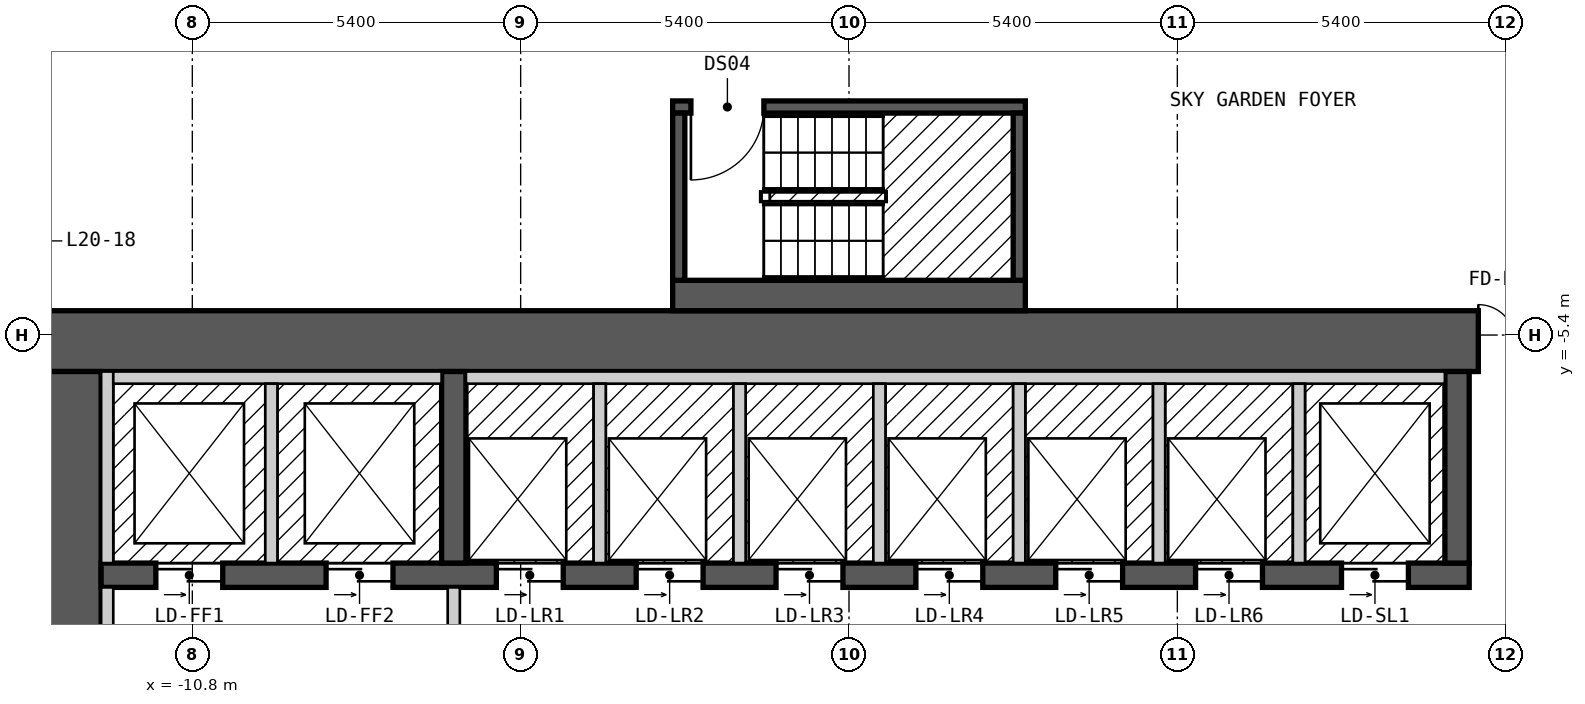
"""IFC4 building model, lengths in metres.
Left out: names, types, materials, properties, quantities, classifications, styles, units other than length and angle.
Written with IfcOpenShell. Run it as: python <this file> out.ifc"""

import sys

from ifc_helpers import new_model, si_unit, direction, frame, frame_2d, origin, place, context, subcontext, project, spatial, rectangle, extrude, element, fill, save


model = new_model("IFC4")
c1 = context("Model", 3, precision=1e-05, world=origin(), true_north=direction((0.0, 1.0)))
c2 = subcontext(c1, "Body", "Model", "MODEL_VIEW")
j1 = project(units=[si_unit("LENGTHUNIT", "METRE"), si_unit("PLANEANGLEUNIT", "RADIAN")], contexts=[c1])
p1 = place(None, origin())
s1 = spatial("IfcSite", under=j1, at=p1, CompositionType="ELEMENT")
p2 = place(p1, origin())
s2 = spatial("IfcBuilding", under=s1, at=p2, CompositionType="ELEMENT")
p3 = place(p2, frame((0.0, 0.0, 66.0)))
s3 = spatial("IfcBuildingStorey", under=s2, at=p3, CompositionType="ELEMENT", Elevation=66.0)
p4 = place(p3, frame((-13.3, -5.5, 0.0), z_axis=(0.0, 0.0, 1.0), x_axis=(1.0, 0.0, 0.0)))
e1 = element("IfcWall", 1, at=p4, inside=s3, PredefinedType="SHEAR", context=c2, shape_type="SweptSolid", body=[
    extrude(rectangle(XDim=26.6, YDim=1.0, at=frame_2d((13.3, 0.0))), origin(), (0.0, 0.0, 1.0), 5.7),
])
p5 = place(p4, frame((23.65, 0.0, 0.0)))
e2 = element("IfcOpeningElement", 2, at=p5, cuts=e1, PredefinedType="OPENING", context=c2, shape_type="SweptSolid", body=[
    extrude(rectangle(XDim=1.2, YDim=2.1, at=frame_2d((0.6, 1.05))), frame((0.0, 0.51, 0.0), z_axis=(0.0, -1.0, 0.0), x_axis=(1.0, 0.0, 0.0)), (0.0, 0.0, 1.0), 1.02),
])
p6 = place(p3, frame((-12.8, -18.0, 0.0), z_axis=(0.0, 0.0, 1.0), x_axis=(0.0, 1.0, 0.0)))
e3 = element("IfcWall", 3, at=p6, inside=s3, PredefinedType="SHEAR", context=c2, shape_type="SweptSolid", body=[
    extrude(rectangle(XDim=12.0, YDim=1.0, at=frame_2d((6.0, 0.0))), origin(), (0.0, 0.0, 1.0), 5.7),
])
p7 = place(p6, frame((3.8, 0.0, 0.0)))
e4 = element("IfcOpeningElement", 4, at=p7, cuts=e3, PredefinedType="OPENING", context=c2, shape_type="SweptSolid", body=[
    extrude(rectangle(XDim=1.2, YDim=2.1, at=frame_2d((0.6, 1.05))), frame((0.0, 0.51, 0.0), z_axis=(0.0, -1.0, 0.0), x_axis=(1.0, 0.0, 0.0)), (0.0, 0.0, 1.0), 1.02),
])
p8 = place(p3, frame((-12.3, -9.35, 0.0), z_axis=(0.0, 0.0, 1.0), x_axis=(1.0, 0.0, 0.0)))
e5 = element("IfcWall", 5, at=p8, inside=s3, PredefinedType="SHEAR", context=c2, shape_type="SweptSolid", body=[
    extrude(rectangle(XDim=22.5, YDim=0.4, at=frame_2d((11.25, 0.0))), origin(), (0.0, 0.0, 1.0), 5.7),
])
p9 = place(p8, frame((0.9, 0.0, 0.0)))
e6 = element("IfcOpeningElement", 6, at=p9, cuts=e5, PredefinedType="OPENING", context=c2, shape_type="SweptSolid", body=[
    extrude(rectangle(XDim=1.1, YDim=2.1, at=frame_2d((0.55, 1.05))), frame((0.0, 0.21, 0.0), z_axis=(0.0, -1.0, 0.0), x_axis=(1.0, 0.0, 0.0)), (0.0, 0.0, 1.0), 0.42),
])
p10 = place(p8, frame((3.7, 0.0, 0.0)))
e7 = element("IfcOpeningElement", 7, at=p10, cuts=e5, PredefinedType="OPENING", context=c2, shape_type="SweptSolid", body=[
    extrude(rectangle(XDim=1.1, YDim=2.1, at=frame_2d((0.55, 1.05))), frame((0.0, 0.21, 0.0), z_axis=(0.0, -1.0, 0.0), x_axis=(1.0, 0.0, 0.0)), (0.0, 0.0, 1.0), 0.42),
])
p11 = place(p8, frame((6.5, 0.0, 0.0)))
e8 = element("IfcOpeningElement", 8, at=p11, cuts=e5, PredefinedType="OPENING", context=c2, shape_type="SweptSolid", body=[
    extrude(rectangle(XDim=1.1, YDim=2.1, at=frame_2d((0.55, 1.05))), frame((0.0, 0.21, 0.0), z_axis=(0.0, -1.0, 0.0), x_axis=(1.0, 0.0, 0.0)), (0.0, 0.0, 1.0), 0.42),
])
p12 = place(p8, frame((8.8, 0.0, 0.0)))
e9 = element("IfcOpeningElement", 9, at=p12, cuts=e5, PredefinedType="OPENING", context=c2, shape_type="SweptSolid", body=[
    extrude(rectangle(XDim=1.1, YDim=2.1, at=frame_2d((0.55, 1.05))), frame((0.0, 0.21, 0.0), z_axis=(0.0, -1.0, 0.0), x_axis=(1.0, 0.0, 0.0)), (0.0, 0.0, 1.0), 0.42),
])
p13 = place(p8, frame((11.1, 0.0, 0.0)))
e10 = element("IfcOpeningElement", 10, at=p13, cuts=e5, PredefinedType="OPENING", context=c2, shape_type="SweptSolid", body=[
    extrude(rectangle(XDim=1.1, YDim=2.1, at=frame_2d((0.55, 1.05))), frame((0.0, 0.21, 0.0), z_axis=(0.0, -1.0, 0.0), x_axis=(1.0, 0.0, 0.0)), (0.0, 0.0, 1.0), 0.42),
])
p14 = place(p8, frame((13.4, 0.0, 0.0)))
e11 = element("IfcOpeningElement", 11, at=p14, cuts=e5, PredefinedType="OPENING", context=c2, shape_type="SweptSolid", body=[
    extrude(rectangle(XDim=1.1, YDim=2.1, at=frame_2d((0.55, 1.05))), frame((0.0, 0.21, 0.0), z_axis=(0.0, -1.0, 0.0), x_axis=(1.0, 0.0, 0.0)), (0.0, 0.0, 1.0), 0.42),
])
p15 = place(p8, frame((15.7, 0.0, 0.0)))
e12 = element("IfcOpeningElement", 12, at=p15, cuts=e5, PredefinedType="OPENING", context=c2, shape_type="SweptSolid", body=[
    extrude(rectangle(XDim=1.1, YDim=2.1, at=frame_2d((0.55, 1.05))), frame((0.0, 0.21, 0.0), z_axis=(0.0, -1.0, 0.0), x_axis=(1.0, 0.0, 0.0)), (0.0, 0.0, 1.0), 0.42),
])
p16 = place(p8, frame((18.0, 0.0, 0.0)))
e13 = element("IfcOpeningElement", 13, at=p16, cuts=e5, PredefinedType="OPENING", context=c2, shape_type="SweptSolid", body=[
    extrude(rectangle(XDim=1.1, YDim=2.1, at=frame_2d((0.55, 1.05))), frame((0.0, 0.21, 0.0), z_axis=(0.0, -1.0, 0.0), x_axis=(1.0, 0.0, 0.0)), (0.0, 0.0, 1.0), 0.42),
])
p17 = place(p8, frame((20.4, 0.0, 0.0)))
e14 = element("IfcOpeningElement", 14, at=p17, cuts=e5, PredefinedType="OPENING", context=c2, shape_type="SweptSolid", body=[
    extrude(rectangle(XDim=1.1, YDim=2.1, at=frame_2d((0.55, 1.05))), frame((0.0, 0.21, 0.0), z_axis=(0.0, -1.0, 0.0), x_axis=(1.0, 0.0, 0.0)), (0.0, 0.0, 1.0), 0.42),
])
for number, where, z_axis, x_axis in (
    (15, (-6.5, -9.15, 0.0), (0.0, 0.0, 1.0), (0.0, 1.0, 0.0)),
    (16, (10.0, -9.15, 0.0), (0.0, 0.0, 1.0), (0.0, 1.0, 0.0)),
):
    element("IfcWall", number, at=place(p3, frame(where, z_axis=z_axis, x_axis=x_axis)), inside=s3, PredefinedType="SHEAR", context=c2, shape_type="SweptSolid", body=[
        extrude(rectangle(XDim=3.15, YDim=0.4, at=frame_2d((1.575, 0.0))), origin(), (0.0, 0.0, 1.0), 5.7),
    ])
p18 = place(p3, frame((-2.9, -4.75, 0.0), z_axis=(0.0, 0.0, 1.0), x_axis=(1.0, 0.0, 0.0)))
e17 = element("IfcWall", 17, at=p18, inside=s3, PredefinedType="SOLIDWALL", context=c2, shape_type="SweptSolid", body=[
    extrude(rectangle(XDim=5.8, YDim=0.5, at=frame_2d((2.9, 0.0))), origin(), (0.0, 0.0, 1.0), 5.7),
])
p19 = place(p3, frame((-2.9, -1.65, 0.0), z_axis=(0.0, 0.0, 1.0), x_axis=(1.0, 0.0, 0.0)))
e18 = element("IfcWall", 18, at=p19, inside=s3, PredefinedType="SOLIDWALL", context=c2, shape_type="SweptSolid", body=[
    extrude(rectangle(XDim=5.8, YDim=0.2, at=frame_2d((2.9, 0.0))), origin(), (0.0, 0.0, 1.0), 5.7),
])
p20 = place(p19, frame((0.3, 0.0, 0.0)))
e19 = element("IfcOpeningElement", 19, at=p20, cuts=e18, PredefinedType="OPENING", context=c2, shape_type="SweptSolid", body=[
    extrude(rectangle(XDim=1.2, YDim=2.1, at=frame_2d((0.6, 1.05))), frame((0.0, 0.11, 0.0), z_axis=(0.0, -1.0, 0.0), x_axis=(1.0, 0.0, 0.0)), (0.0, 0.0, 1.0), 0.22),
])
for number, where, z_axis, x_axis in (
    (20, (-2.8, -4.5, 0.0), (0.0, 0.0, 1.0), (0.0, 1.0, 0.0)),
    (21, (2.8, -4.5, 0.0), (0.0, 0.0, 1.0), (0.0, 1.0, 0.0)),
):
    element("IfcWall", number, at=place(p3, frame(where, z_axis=z_axis, x_axis=x_axis)), inside=s3, PredefinedType="SOLIDWALL", context=c2, shape_type="SweptSolid", body=[
        extrude(rectangle(XDim=2.75, YDim=0.2, at=frame_2d((1.375, 0.0))), origin(), (0.0, 0.0, 1.0), 5.7),
    ])
p21 = place(p3, frame((-12.2, -13.0, 0.0), z_axis=(0.0, 0.0, 1.0), x_axis=(0.0, 1.0, 0.0)))
e22 = element("IfcWall", 22, at=p21, inside=s3, PredefinedType="PARTITIONING", context=c2, shape_type="SweptSolid", body=[
    extrude(rectangle(XDim=3.45, YDim=0.2, at=frame_2d((1.725, 0.0))), origin(), (0.0, 0.0, 1.0), 5.7),
])
p22 = place(p3, frame((-12.2, -9.15, 0.0), z_axis=(0.0, 0.0, 1.0), x_axis=(0.0, 1.0, 0.0)))
e23 = element("IfcWall", 23, at=p22, inside=s3, PredefinedType="SOLIDWALL", context=c2, shape_type="SweptSolid", body=[
    extrude(rectangle(XDim=3.15, YDim=0.2, at=frame_2d((1.575, 0.0))), origin(), (0.0, 0.0, 1.0), 5.7),
])
p23 = place(p3, frame((-12.1, -6.1, 0.0), z_axis=(0.0, 0.0, 1.0), x_axis=(1.0, 0.0, 0.0)))
e24 = element("IfcWall", 24, at=p23, inside=s3, PredefinedType="SOLIDWALL", context=c2, shape_type="SweptSolid", body=[
    extrude(rectangle(XDim=5.4, YDim=0.2, at=frame_2d((2.7, 0.0))), origin(), (0.0, 0.0, 1.0), 5.7),
])
p24 = place(p3, frame((-9.5, -9.15, 0.0), z_axis=(0.0, 0.0, 1.0), x_axis=(0.0, 1.0, 0.0)))
e25 = element("IfcWall", 25, at=p24, inside=s3, PredefinedType="SOLIDWALL", context=c2, shape_type="SweptSolid", body=[
    extrude(rectangle(XDim=2.95, YDim=0.2, at=frame_2d((1.475, 0.0))), origin(), (0.0, 0.0, 1.0), 5.7),
])
p25 = place(p3, frame((-6.5, -14.45, 0.0), z_axis=(0.0, 0.0, 1.0), x_axis=(0.0, 1.0, 0.0)))
e26 = element("IfcWall", 26, at=p25, inside=s3, PredefinedType="PARTITIONING", context=c2, shape_type="SweptSolid", body=[
    extrude(rectangle(XDim=4.9, YDim=0.2, at=frame_2d((2.45, 0.0))), origin(), (0.0, 0.0, 1.0), 5.7),
])
p26 = place(p25, frame((3.15, 0.0, 0.0), z_axis=(0.0, 0.0, 1.0), x_axis=(-1.0, 0.0, 0.0)))
e27 = element("IfcOpeningElement", 27, at=p26, cuts=e26, PredefinedType="OPENING", context=c2, shape_type="SweptSolid", body=[
    extrude(rectangle(XDim=1.4, YDim=2.1, at=frame_2d((0.7, 1.05))), frame((0.0, 0.11, 0.0), z_axis=(0.0, -1.0, 0.0), x_axis=(1.0, 0.0, 0.0)), (0.0, 0.0, 1.0), 0.22),
])
p27 = place(p3, frame((-6.3, -6.1, 0.0), z_axis=(0.0, 0.0, 1.0), x_axis=(1.0, 0.0, 0.0)))
e28 = element("IfcWall", 28, at=p27, inside=s3, PredefinedType="SOLIDWALL", context=c2, shape_type="SweptSolid", body=[
    extrude(rectangle(XDim=16.1, YDim=0.2, at=frame_2d((8.05, 0.0))), origin(), (0.0, 0.0, 1.0), 5.7),
])
for number, where, z_axis, x_axis in (
    (29, (-4.1, -9.15, 0.0), (0.0, 0.0, 1.0), (0.0, 1.0, 0.0)),
    (30, (-1.8, -9.15, 0.0), (0.0, 0.0, 1.0), (0.0, 1.0, 0.0)),
    (31, (0.5, -9.15, 0.0), (0.0, 0.0, 1.0), (0.0, 1.0, 0.0)),
    (32, (2.8, -9.15, 0.0), (0.0, 0.0, 1.0), (0.0, 1.0, 0.0)),
    (33, (5.1, -9.15, 0.0), (0.0, 0.0, 1.0), (0.0, 1.0, 0.0)),
    (34, (7.4, -9.15, 0.0), (0.0, 0.0, 1.0), (0.0, 1.0, 0.0)),
):
    element("IfcWall", number, at=place(p3, frame(where, z_axis=z_axis, x_axis=x_axis)), inside=s3, PredefinedType="SOLIDWALL", context=c2, shape_type="SweptSolid", body=[
        extrude(rectangle(XDim=2.95, YDim=0.2, at=frame_2d((1.475, 0.0))), origin(), (0.0, 0.0, 1.0), 5.7),
    ])
p28 = place(p20, origin())
e35 = element("IfcDoor", 35, at=p28, inside=s3, OperationType="SINGLE_SWING_LEFT", PredefinedType="DOOR", context=c2, shape_type="SweptSolid", body=[
    extrude(rectangle(XDim=1.2, YDim=2.1, at=frame_2d((0.6, 1.05))), frame((0.0, 0.025, 0.0), z_axis=(0.0, -1.0, 0.0), x_axis=(1.0, 0.0, 0.0)), (0.0, 0.0, 1.0), 0.05),
])
fill(e19, e35)
p29 = place(p9, origin())
e36 = element("IfcDoor", 36, at=p29, inside=s3, OperationType="DOUBLE_DOOR_SLIDING", PredefinedType="DOOR", context=c2, shape_type="SweptSolid", body=[
    extrude(rectangle(XDim=1.1, YDim=2.1, at=frame_2d((0.55, 1.05))), frame((0.0, 0.025, 0.0), z_axis=(0.0, -1.0, 0.0), x_axis=(1.0, 0.0, 0.0)), (0.0, 0.0, 1.0), 0.05),
])
fill(e6, e36)
p30 = place(p10, origin())
e37 = element("IfcDoor", 37, at=p30, inside=s3, OperationType="DOUBLE_DOOR_SLIDING", PredefinedType="DOOR", context=c2, shape_type="SweptSolid", body=[
    extrude(rectangle(XDim=1.1, YDim=2.1, at=frame_2d((0.55, 1.05))), frame((0.0, 0.025, 0.0), z_axis=(0.0, -1.0, 0.0), x_axis=(1.0, 0.0, 0.0)), (0.0, 0.0, 1.0), 0.05),
])
fill(e7, e37)
p31 = place(p11, origin())
e38 = element("IfcDoor", 38, at=p31, inside=s3, OperationType="DOUBLE_DOOR_SLIDING", PredefinedType="DOOR", context=c2, shape_type="SweptSolid", body=[
    extrude(rectangle(XDim=1.1, YDim=2.1, at=frame_2d((0.55, 1.05))), frame((0.0, 0.025, 0.0), z_axis=(0.0, -1.0, 0.0), x_axis=(1.0, 0.0, 0.0)), (0.0, 0.0, 1.0), 0.05),
])
fill(e8, e38)
p32 = place(p12, origin())
e39 = element("IfcDoor", 39, at=p32, inside=s3, OperationType="DOUBLE_DOOR_SLIDING", PredefinedType="DOOR", context=c2, shape_type="SweptSolid", body=[
    extrude(rectangle(XDim=1.1, YDim=2.1, at=frame_2d((0.55, 1.05))), frame((0.0, 0.025, 0.0), z_axis=(0.0, -1.0, 0.0), x_axis=(1.0, 0.0, 0.0)), (0.0, 0.0, 1.0), 0.05),
])
fill(e9, e39)
p33 = place(p13, origin())
e40 = element("IfcDoor", 40, at=p33, inside=s3, OperationType="DOUBLE_DOOR_SLIDING", PredefinedType="DOOR", context=c2, shape_type="SweptSolid", body=[
    extrude(rectangle(XDim=1.1, YDim=2.1, at=frame_2d((0.55, 1.05))), frame((0.0, 0.025, 0.0), z_axis=(0.0, -1.0, 0.0), x_axis=(1.0, 0.0, 0.0)), (0.0, 0.0, 1.0), 0.05),
])
fill(e10, e40)
p34 = place(p14, origin())
e41 = element("IfcDoor", 41, at=p34, inside=s3, OperationType="DOUBLE_DOOR_SLIDING", PredefinedType="DOOR", context=c2, shape_type="SweptSolid", body=[
    extrude(rectangle(XDim=1.1, YDim=2.1, at=frame_2d((0.55, 1.05))), frame((0.0, 0.025, 0.0), z_axis=(0.0, -1.0, 0.0), x_axis=(1.0, 0.0, 0.0)), (0.0, 0.0, 1.0), 0.05),
])
fill(e11, e41)
p35 = place(p15, origin())
e42 = element("IfcDoor", 42, at=p35, inside=s3, OperationType="DOUBLE_DOOR_SLIDING", PredefinedType="DOOR", context=c2, shape_type="SweptSolid", body=[
    extrude(rectangle(XDim=1.1, YDim=2.1, at=frame_2d((0.55, 1.05))), frame((0.0, 0.025, 0.0), z_axis=(0.0, -1.0, 0.0), x_axis=(1.0, 0.0, 0.0)), (0.0, 0.0, 1.0), 0.05),
])
fill(e12, e42)
p36 = place(p16, origin())
e43 = element("IfcDoor", 43, at=p36, inside=s3, OperationType="DOUBLE_DOOR_SLIDING", PredefinedType="DOOR", context=c2, shape_type="SweptSolid", body=[
    extrude(rectangle(XDim=1.1, YDim=2.1, at=frame_2d((0.55, 1.05))), frame((0.0, 0.025, 0.0), z_axis=(0.0, -1.0, 0.0), x_axis=(1.0, 0.0, 0.0)), (0.0, 0.0, 1.0), 0.05),
])
fill(e13, e43)
p37 = place(p17, origin())
e44 = element("IfcDoor", 44, at=p37, inside=s3, OperationType="DOUBLE_DOOR_SLIDING", PredefinedType="DOOR", context=c2, shape_type="SweptSolid", body=[
    extrude(rectangle(XDim=1.1, YDim=2.1, at=frame_2d((0.55, 1.05))), frame((0.0, 0.025, 0.0), z_axis=(0.0, -1.0, 0.0), x_axis=(1.0, 0.0, 0.0)), (0.0, 0.0, 1.0), 0.05),
])
fill(e14, e44)
p38 = place(p5, origin())
e45 = element("IfcDoor", 45, at=p38, inside=s3, OperationType="DOUBLE_DOOR_SINGLE_SWING", PredefinedType="DOOR", context=c2, shape_type="SweptSolid", body=[
    extrude(rectangle(XDim=1.2, YDim=2.1, at=frame_2d((0.6, 1.05))), frame((0.0, 0.025, 0.0), z_axis=(0.0, -1.0, 0.0), x_axis=(1.0, 0.0, 0.0)), (0.0, 0.0, 1.0), 0.05),
])
fill(e2, e45)
save(model, sys.argv[1])
